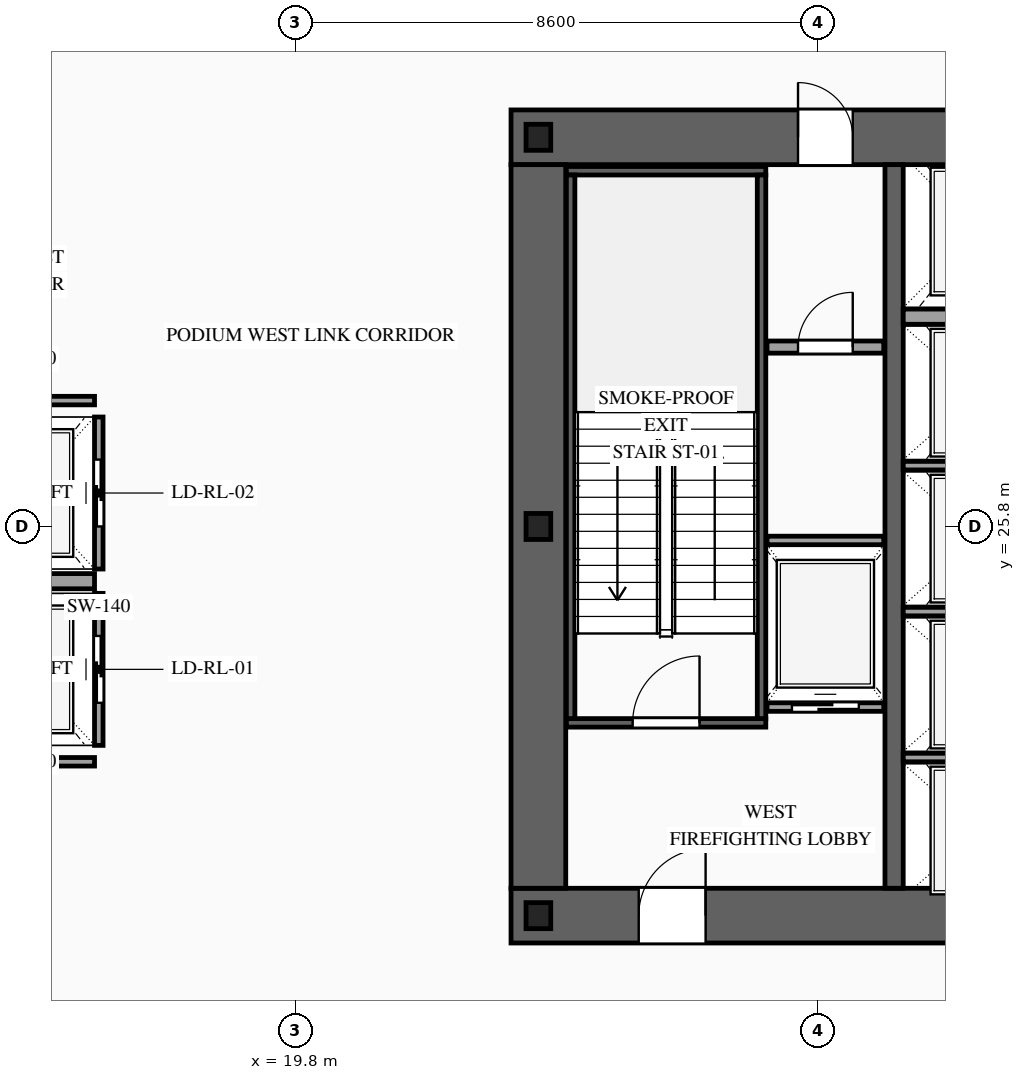
"""IFC4 building model, lengths in metres.
Left out: names, types, materials, properties, quantities, classifications, styles, units other than length and angle.
Written with IfcOpenShell. Run it as: python <this file> out.ifc"""

import sys

from ifc_helpers import new_model, si_unit, direction, frame, frame_2d, origin, origin_2d, place, context, subcontext, project, spatial, rectangle, i_section, extrude, source, transform, mapped, element, fill, save


model = new_model("IFC4")
c1 = context("Model", 3, precision=1e-05, world=origin(), true_north=direction((0.0, 1.0)))
c2 = subcontext(c1, "Body", "Model", "MODEL_VIEW")
j1 = project(units=[si_unit("LENGTHUNIT", "METRE"), si_unit("PLANEANGLEUNIT", "RADIAN")], contexts=[c1])
p1 = place(None, origin())
s1 = spatial("IfcSite", under=j1, at=p1, CompositionType="ELEMENT")
p2 = place(p1, origin())
s2 = spatial("IfcBuilding", under=s1, at=p2, CompositionType="ELEMENT")
p3 = place(p2, frame((0.0, 0.0, 10.2)))
s3 = spatial("IfcBuildingStorey", under=s2, at=p3, CompositionType="ELEMENT", Elevation=10.2)
p4 = place(p3, frame((23.35, 19.4, 0.0), z_axis=(0.0, 0.0, 1.0), x_axis=(1.0, 0.0, 0.0)))
e1 = element("IfcWall", 1, at=p4, inside=s3, PredefinedType="SHEAR", context=c2, shape_type="SweptSolid", body=[
    extrude(rectangle(XDim=27.3, YDim=0.9, at=frame_2d((13.65, 0.0))), origin(), (0.0, 0.0, 1.0), 4.8),
])
p5 = place(p4, frame((2.1, 0.0, 0.0)))
e2 = element("IfcOpeningElement", 2, at=p5, cuts=e1, PredefinedType="OPENING", context=c2, shape_type="SweptSolid", body=[
    extrude(rectangle(XDim=1.1, YDim=2.2, at=frame_2d((0.55, 1.1))), frame((0.0, 0.465, 0.0), z_axis=(0.0, -1.0, 0.0), x_axis=(1.0, 0.0, 0.0)), (0.0, 0.0, 1.0), 0.93),
])
p6 = place(p4, frame((10.0, 0.0, 0.0)))
e3 = element("IfcOpeningElement", 3, at=p6, cuts=e1, PredefinedType="OPENING", context=c2, shape_type="SweptSolid", body=[
    extrude(rectangle(XDim=1.1, YDim=2.2, at=frame_2d((0.55, 1.1))), frame((0.0, 0.465, 0.0), z_axis=(0.0, -1.0, 0.0), x_axis=(1.0, 0.0, 0.0)), (0.0, 0.0, 1.0), 0.93),
])
p7 = place(p4, frame((23.2, 0.0, 0.0)))
e4 = element("IfcOpeningElement", 4, at=p7, cuts=e1, PredefinedType="OPENING", context=c2, shape_type="SweptSolid", body=[
    extrude(rectangle(XDim=1.1, YDim=2.2, at=frame_2d((0.55, 1.1))), frame((0.0, 0.465, 0.0), z_axis=(0.0, -1.0, 0.0), x_axis=(1.0, 0.0, 0.0)), (0.0, 0.0, 1.0), 0.93),
])
p8 = place(p4, frame((19.82, 0.0, 0.0)))
e5 = element("IfcOpeningElement", 5, at=p8, cuts=e1, PredefinedType="OPENING", context=c2, shape_type="SweptSolid", body=[
    extrude(rectangle(XDim=0.9, YDim=2.15, at=frame_2d((0.45, 1.075))), frame((0.0, 0.465, 0.0), z_axis=(0.0, -1.0, 0.0), x_axis=(1.0, 0.0, 0.0)), (0.0, 0.0, 1.0), 0.93),
])
p9 = place(p4, frame((18.38, 0.0, 0.0)))
e6 = element("IfcOpeningElement", 6, at=p9, cuts=e1, PredefinedType="OPENING", context=c2, shape_type="SweptSolid", body=[
    extrude(rectangle(XDim=0.9, YDim=2.15, at=frame_2d((0.45, 1.075))), frame((0.0, 0.465, 0.0), z_axis=(0.0, -1.0, 0.0), x_axis=(1.0, 0.0, 0.0)), (0.0, 0.0, 1.0), 0.93),
])
p10 = place(p3, frame((23.35, 32.2, 0.0), z_axis=(0.0, 0.0, 1.0), x_axis=(1.0, 0.0, 0.0)))
e7 = element("IfcWall", 7, at=p10, inside=s3, PredefinedType="SHEAR", context=c2, shape_type="SweptSolid", body=[
    extrude(rectangle(XDim=27.3, YDim=0.9, at=frame_2d((13.65, 0.0))), origin(), (0.0, 0.0, 1.0), 4.8),
])
p11 = place(p10, frame((4.72, 0.0, 0.0)))
e8 = element("IfcOpeningElement", 8, at=p11, cuts=e7, PredefinedType="OPENING", context=c2, shape_type="SweptSolid", body=[
    extrude(rectangle(XDim=0.9, YDim=2.15, at=frame_2d((0.45, 1.075))), frame((0.0, 0.465, 0.0), z_axis=(0.0, -1.0, 0.0), x_axis=(1.0, 0.0, 0.0)), (0.0, 0.0, 1.0), 0.93),
])
p12 = place(p10, frame((10.0, 0.0, 0.0)))
e9 = element("IfcOpeningElement", 9, at=p12, cuts=e7, PredefinedType="OPENING", context=c2, shape_type="SweptSolid", body=[
    extrude(rectangle(XDim=1.1, YDim=2.2, at=frame_2d((0.55, 1.1))), frame((0.0, 0.465, 0.0), z_axis=(0.0, -1.0, 0.0), x_axis=(1.0, 0.0, 0.0)), (0.0, 0.0, 1.0), 0.93),
])
p13 = place(p10, frame((15.85, 0.0, 0.0)))
e10 = element("IfcOpeningElement", 10, at=p13, cuts=e7, PredefinedType="OPENING", context=c2, shape_type="SweptSolid", body=[
    extrude(rectangle(XDim=1.1, YDim=2.2, at=frame_2d((0.55, 1.1))), frame((0.0, 0.465, 0.0), z_axis=(0.0, -1.0, 0.0), x_axis=(1.0, 0.0, 0.0)), (0.0, 0.0, 1.0), 0.93),
])
m1 = source(origin(), c2, "Body", "SweptSolid", [
    extrude(rectangle(XDim=11.9, YDim=0.9, at=frame_2d((5.95, 0.0))), origin(), (0.0, 0.0, 1.0), 4.8),
])
p14 = place(p3, frame((23.8, 19.85, 0.0), z_axis=(0.0, 0.0, 1.0), x_axis=(0.0, 1.0, 0.0)))
e11 = element("IfcWall", 11, at=p14, inside=s3, PredefinedType="SHEAR", context=c2, shape_type="MappedRepresentation", body=[
    mapped(m1, transform((0.0, 0.0, 0.0), scale=1.0)),
])
m2 = source(origin(), c2, "Body", "SweptSolid", [
    extrude(rectangle(XDim=11.9, YDim=0.3, at=frame_2d((5.95, 0.0))), origin(), (0.0, 0.0, 1.0), 4.8),
])
p15 = place(p3, frame((29.65, 19.85, 0.0), z_axis=(0.0, 0.0, 1.0), x_axis=(0.0, 1.0, 0.0)))
e12 = element("IfcWall", 12, at=p15, inside=s3, PredefinedType="SOLIDWALL", context=c2, shape_type="MappedRepresentation", body=[
    mapped(m2, transform((0.0, 0.0, 0.0), scale=1.0)),
])
m3 = source(origin(), c2, "Body", "SweptSolid", [
    extrude(i_section(OverallWidth=0.407, OverallDepth=0.428, WebThickness=0.02, FlangeThickness=0.035, at=origin_2d()), origin(), (0.0, 0.0, 1.0), 4.8),
])
for number, where, z_axis, x_axis in (
    (13, (23.8, 19.4, 0.0), (0.0, 0.0, 1.0), (1.0, 0.0, 0.0)),
    (14, (23.8, 25.8, 0.0), (0.0, 0.0, 1.0), (1.0, 0.0, 0.0)),
    (15, (23.8, 32.2, 0.0), (0.0, 0.0, 1.0), (1.0, 0.0, 0.0)),
):
    element("IfcColumn", number, at=place(p3, frame(where, z_axis=z_axis, x_axis=x_axis)), inside=s3, PredefinedType="COLUMN", context=c2, shape_type="MappedRepresentation", body=[
        mapped(m3, transform((0.0, 0.0, 0.0), scale=1.0)),
    ])
p16 = place(p3, frame((27.56, 22.83, 0.0), z_axis=(0.0, 0.0, 1.0), x_axis=(1.0, 0.0, 0.0)))
e16 = element("IfcWall", 16, at=p16, inside=s3, PredefinedType="SOLIDWALL", context=c2, shape_type="SweptSolid", body=[
    extrude(rectangle(XDim=1.92, YDim=0.14, at=frame_2d((0.96, 0.0))), origin(), (0.0, 0.0, 1.0), 4.52),
])
p17 = place(p16, frame((0.41, 0.0, 0.0)))
e17 = element("IfcOpeningElement", 17, at=p17, cuts=e16, PredefinedType="OPENING", context=c2, shape_type="SweptSolid", body=[
    extrude(rectangle(XDim=1.1, YDim=2.2, at=frame_2d((0.55, 1.1))), frame((0.0, 0.085, 0.0), z_axis=(0.0, -1.0, 0.0), x_axis=(1.0, 0.0, 0.0)), (0.0, 0.0, 1.0), 0.17),
])
m4 = source(origin(), c2, "Body", "SweptSolid", [
    extrude(rectangle(XDim=1.92, YDim=0.14, at=frame_2d((0.96, 0.0))), origin(), (0.0, 0.0, 1.0), 4.52),
])
p18 = place(p3, frame((27.56, 25.57, 0.0), z_axis=(0.0, 0.0, 1.0), x_axis=(1.0, 0.0, 0.0)))
e18 = element("IfcWall", 18, at=p18, inside=s3, PredefinedType="SOLIDWALL", context=c2, shape_type="MappedRepresentation", body=[
    mapped(m4, transform((0.0, 0.0, 0.0), scale=1.0)),
])
m5 = source(origin(), c2, "Body", "SweptSolid", [
    extrude(rectangle(XDim=2.5, YDim=0.14, at=frame_2d((1.25, 0.0))), origin(), (0.0, 0.0, 1.0), 4.52),
])
for number, where, z_axis, x_axis in (
    (19, (29.8, 22.0, 0.0), (0.0, 0.0, 1.0), (1.0, 0.0, 0.0)),
    (20, (29.8, 24.4, 0.0), (0.0, 0.0, 1.0), (1.0, 0.0, 0.0)),
    (21, (29.8, 26.8, 0.0), (0.0, 0.0, 1.0), (1.0, 0.0, 0.0)),
):
    element("IfcWall", number, at=place(p3, frame(where, z_axis=z_axis, x_axis=x_axis)), inside=s3, PredefinedType="SOLIDWALL", context=c2, shape_type="MappedRepresentation", body=[
        mapped(m5, transform((0.0, 0.0, 0.0), scale=1.0)),
    ])
m6 = source(origin(), c2, "Body", "SweptSolid", [
    extrude(rectangle(XDim=2.5, YDim=0.25, at=frame_2d((1.25, 0.0))), origin(), (0.0, 0.0, 1.0), 4.52),
])
p19 = place(p3, frame((29.8, 29.25, 0.0), z_axis=(0.0, 0.0, 1.0), x_axis=(1.0, 0.0, 0.0)))
e22 = element("IfcWall", 22, at=p19, inside=s3, PredefinedType="SOLIDWALL", context=c2, shape_type="MappedRepresentation", body=[
    mapped(m6, transform((0.0, 0.0, 0.0), scale=1.0)),
])
p20 = place(p3, frame((16.57, 22.2, 0.0), z_axis=(0.0, 0.0, 1.0), x_axis=(0.0, 1.0, 0.0)))
e23 = element("IfcWall", 23, at=p20, inside=s3, PredefinedType="SOLIDWALL", context=c2, shape_type="SweptSolid", body=[
    extrude(rectangle(XDim=2.5, YDim=0.14, at=frame_2d((1.25, 0.0))), origin(), (0.0, 0.0, 1.0), 4.52),
])
p21 = place(p20, frame((0.7, 0.0, 0.0)))
e24 = element("IfcOpeningElement", 24, at=p21, cuts=e23, PredefinedType="OPENING", context=c2, shape_type="SweptSolid", body=[
    extrude(rectangle(XDim=1.1, YDim=2.2, at=frame_2d((0.55, 1.1))), frame((0.0, 0.085, 0.0), z_axis=(0.0, -1.0, 0.0), x_axis=(1.0, 0.0, 0.0)), (0.0, 0.0, 1.0), 0.17),
])
m7 = source(origin(), c2, "Body", "SweptSolid", [
    extrude(rectangle(XDim=2.3, YDim=0.25, at=frame_2d((1.15, 0.0))), origin(), (0.0, 0.0, 1.0), 4.52),
])
p22 = place(p3, frame((14.2, 24.9, 0.0), z_axis=(0.0, 0.0, 1.0), x_axis=(1.0, 0.0, 0.0)))
e25 = element("IfcWall", 25, at=p22, inside=s3, PredefinedType="SOLIDWALL", context=c2, shape_type="MappedRepresentation", body=[
    mapped(m7, transform((0.0, 0.0, 0.0), scale=1.0)),
])
m8 = source(origin(), c2, "Body", "SweptSolid", [
    extrude(rectangle(XDim=2.3, YDim=0.14, at=frame_2d((1.15, 0.0))), origin(), (0.0, 0.0, 1.0), 4.52),
])
p23 = place(p3, frame((14.2, 21.93, 0.0), z_axis=(0.0, 0.0, 1.0), x_axis=(1.0, 0.0, 0.0)))
e26 = element("IfcWall", 26, at=p23, inside=s3, PredefinedType="SOLIDWALL", context=c2, shape_type="MappedRepresentation", body=[
    mapped(m8, transform((0.0, 0.0, 0.0), scale=1.0)),
])
p24 = place(p3, frame((16.57, 25.1, 0.0), z_axis=(0.0, 0.0, 1.0), x_axis=(0.0, 1.0, 0.0)))
e27 = element("IfcWall", 27, at=p24, inside=s3, PredefinedType="SOLIDWALL", context=c2, shape_type="SweptSolid", body=[
    extrude(rectangle(XDim=2.5, YDim=0.14, at=frame_2d((1.25, 0.0))), origin(), (0.0, 0.0, 1.0), 4.52),
])
p25 = place(p24, frame((0.7, 0.0, 0.0)))
e28 = element("IfcOpeningElement", 28, at=p25, cuts=e27, PredefinedType="OPENING", context=c2, shape_type="SweptSolid", body=[
    extrude(rectangle(XDim=1.1, YDim=2.2, at=frame_2d((0.55, 1.1))), frame((0.0, 0.085, 0.0), z_axis=(0.0, -1.0, 0.0), x_axis=(1.0, 0.0, 0.0)), (0.0, 0.0, 1.0), 0.17),
])
p26 = place(p3, frame((14.2, 27.87, 0.0), z_axis=(0.0, 0.0, 1.0), x_axis=(1.0, 0.0, 0.0)))
e29 = element("IfcWall", 29, at=p26, inside=s3, PredefinedType="SOLIDWALL", context=c2, shape_type="MappedRepresentation", body=[
    mapped(m8, transform((0.0, 0.0, 0.0), scale=1.0)),
])
p27 = place(p3, frame((24.26, 22.57, 0.0), z_axis=(0.0, 0.0, 1.0), x_axis=(1.0, 0.0, 0.0)))
e30 = element("IfcWall", 30, at=p27, inside=s3, PredefinedType="SOLIDWALL", context=c2, shape_type="SweptSolid", body=[
    extrude(rectangle(XDim=3.28, YDim=0.14, at=frame_2d((1.64, 0.0))), origin(), (0.0, 0.0, 1.0), 4.52),
])
p28 = place(p27, frame((1.09, 0.0, 0.0)))
e31 = element("IfcOpeningElement", 31, at=p28, cuts=e30, PredefinedType="OPENING", context=c2, shape_type="SweptSolid", body=[
    extrude(rectangle(XDim=1.1, YDim=2.2, at=frame_2d((0.55, 1.1))), frame((0.0, 0.085, 0.0), z_axis=(0.0, -1.0, 0.0), x_axis=(1.0, 0.0, 0.0)), (0.0, 0.0, 1.0), 0.17),
])
m9 = source(origin(), c2, "Body", "SweptSolid", [
    extrude(rectangle(XDim=3.28, YDim=0.14, at=frame_2d((1.64, 0.0))), origin(), (0.0, 0.0, 1.0), 4.52),
])
p29 = place(p3, frame((24.26, 31.65, 0.0), z_axis=(0.0, 0.0, 1.0), x_axis=(1.0, 0.0, 0.0)))
e32 = element("IfcWall", 32, at=p29, inside=s3, PredefinedType="SOLIDWALL", context=c2, shape_type="MappedRepresentation", body=[
    mapped(m9, transform((0.0, 0.0, 0.0), scale=1.0)),
])
m10 = source(origin(), c2, "Body", "SweptSolid", [
    extrude(rectangle(XDim=8.94, YDim=0.14, at=frame_2d((4.47, 0.0))), origin(), (0.0, 0.0, 1.0), 4.52),
])
for number, where, z_axis, x_axis in (
    (33, (24.33, 22.64, 0.0), (0.0, 0.0, 1.0), (0.0, 1.0, 0.0)),
    (34, (27.47, 22.64, 0.0), (0.0, 0.0, 1.0), (0.0, 1.0, 0.0)),
):
    element("IfcWall", number, at=place(p3, frame(where, z_axis=z_axis, x_axis=x_axis)), inside=s3, PredefinedType="SOLIDWALL", context=c2, shape_type="MappedRepresentation", body=[
        mapped(m10, transform((0.0, 0.0, 0.0), scale=1.0)),
    ])
p30 = place(p3, frame((27.56, 28.75, 0.0), z_axis=(0.0, 0.0, 1.0), x_axis=(1.0, 0.0, 0.0)))
e35 = element("IfcWall", 35, at=p30, inside=s3, PredefinedType="PARTITIONING", context=c2, shape_type="SweptSolid", body=[
    extrude(rectangle(XDim=1.92, YDim=0.2, at=frame_2d((0.96, 0.0))), origin(), (0.0, 0.0, 1.0), 4.52),
])
p31 = place(p30, frame((0.51, 0.0, 0.0)))
e36 = element("IfcOpeningElement", 36, at=p31, cuts=e35, PredefinedType="OPENING", context=c2, shape_type="SweptSolid", body=[
    extrude(rectangle(XDim=0.9, YDim=2.15, at=frame_2d((0.45, 1.075))), frame((0.0, 0.115, 0.0), z_axis=(0.0, -1.0, 0.0), x_axis=(1.0, 0.0, 0.0)), (0.0, 0.0, 1.0), 0.23),
])
m11 = source(origin(), c2, "Body", "SweptSolid", [
    extrude(rectangle(XDim=1.1, YDim=2.2, at=frame_2d((0.55, 1.1))), frame((0.0, 0.025, 0.0), z_axis=(0.0, -1.0, 0.0), x_axis=(1.0, 0.0, 0.0)), (0.0, 0.0, 1.0), 0.05),
])
p32 = place(p17, origin())
e37 = element("IfcDoor", 37, at=p32, inside=s3, OperationType="SLIDING_TO_LEFT", PredefinedType="DOOR", context=c2, shape_type="MappedRepresentation", body=[
    mapped(m11, transform((0.0, 0.0, 0.0), scale=1.0)),
])
fill(e17, e37)
p33 = place(p21, origin())
e38 = element("IfcDoor", 38, at=p33, inside=s3, OperationType="SLIDING_TO_RIGHT", PredefinedType="DOOR", context=c2, shape_type="MappedRepresentation", body=[
    mapped(m11, transform((0.0, 0.0, 0.0), scale=1.0)),
])
fill(e24, e38)
p34 = place(p25, origin())
e39 = element("IfcDoor", 39, at=p34, inside=s3, OperationType="SLIDING_TO_LEFT", PredefinedType="DOOR", context=c2, shape_type="MappedRepresentation", body=[
    mapped(m11, transform((0.0, 0.0, 0.0), scale=1.0)),
])
fill(e28, e39)
m12 = source(origin(), c2, "Body", "SweptSolid", [
    extrude(rectangle(XDim=1.1, YDim=2.2, at=frame_2d((0.55, 1.1))), frame((0.0, 0.025, 0.0), z_axis=(0.0, -1.0, 0.0), x_axis=(1.0, 0.0, 0.0)), (0.0, 0.0, 1.0), 0.05),
])
p35 = place(p28, origin())
e40 = element("IfcDoor", 40, at=p35, inside=s3, OperationType="SINGLE_SWING_RIGHT", PredefinedType="DOOR", context=c2, shape_type="MappedRepresentation", body=[
    mapped(m12, transform((0.0, 0.0, 0.0), scale=1.0)),
])
fill(e31, e40)
p36 = place(p5, origin())
e41 = element("IfcDoor", 41, at=p36, inside=s3, OperationType="SINGLE_SWING_RIGHT", PredefinedType="DOOR", context=c2, shape_type="MappedRepresentation", body=[
    mapped(m12, transform((0.0, 0.0, 0.0), scale=1.0)),
])
fill(e2, e41)
m13 = source(origin(), c2, "Body", "SweptSolid", [
    extrude(rectangle(XDim=0.9, YDim=2.15, at=frame_2d((0.45, 1.075))), frame((0.0, 0.025, 0.0), z_axis=(0.0, -1.0, 0.0), x_axis=(1.0, 0.0, 0.0)), (0.0, 0.0, 1.0), 0.05),
])
p37 = place(p11, origin())
e42 = element("IfcDoor", 42, at=p37, inside=s3, OperationType="SINGLE_SWING_LEFT", PredefinedType="DOOR", context=c2, shape_type="MappedRepresentation", body=[
    mapped(m13, transform((0.0, 0.0, 0.0), scale=1.0)),
])
fill(e8, e42)
p38 = place(p31, origin())
e43 = element("IfcDoor", 43, at=p38, inside=s3, OperationType="SINGLE_SWING_RIGHT", PredefinedType="DOOR", context=c2, shape_type="MappedRepresentation", body=[
    mapped(m13, transform((0.0, 0.0, 0.0), scale=1.0)),
])
fill(e36, e43)
save(model, sys.argv[1])
